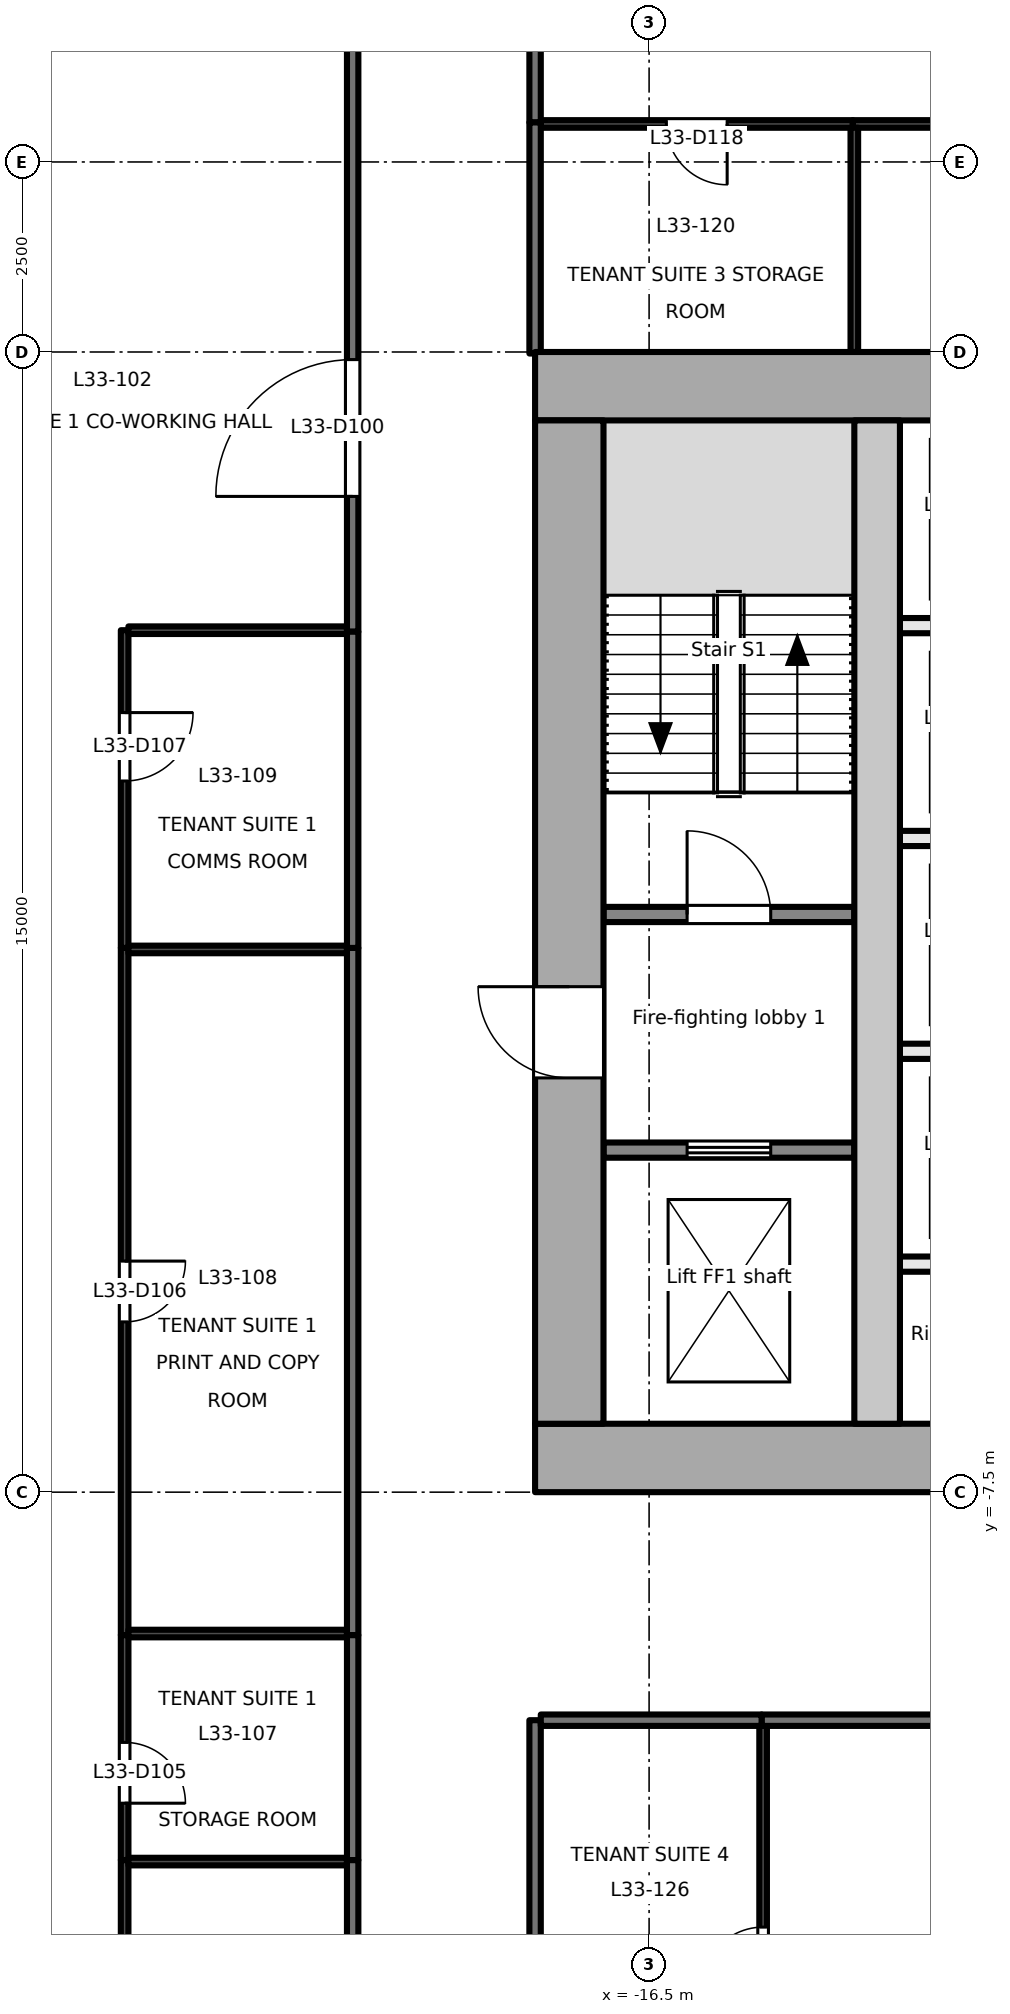
"""IFC4 building model, lengths in metres.
Left out: names, types, materials, properties, quantities, classifications, styles, units other than length and angle.
Written with IfcOpenShell. Run it as: python <this file> out.ifc"""

import sys

from ifc_helpers import new_model, si_unit, direction, frame, frame_2d, origin, place, context, subcontext, project, spatial, rectangle, extrude, element, fill, save


model = new_model("IFC4")
c1 = context("Model", 3, precision=1e-05, world=origin(), true_north=direction((0.0, 1.0)))
c2 = subcontext(c1, "Body", "Model", "MODEL_VIEW")
j1 = project(units=[si_unit("LENGTHUNIT", "METRE"), si_unit("PLANEANGLEUNIT", "RADIAN")], contexts=[c1])
p1 = place(None, origin())
s1 = spatial("IfcSite", under=j1, at=p1, CompositionType="ELEMENT")
p2 = place(p1, origin())
s2 = spatial("IfcBuilding", under=s1, at=p2, CompositionType="ELEMENT")
p3 = place(p2, frame((0.0, 0.0, 146.1)))
s3 = spatial("IfcBuildingStorey", under=s2, at=p3, CompositionType="ELEMENT", Elevation=146.1)
p4 = place(p3, frame((-18.0, -7.05, -0.2), z_axis=(0.0, 0.0, 1.0), x_axis=(1.0, 0.0, 0.0)))
e1 = element("IfcWall", 1, at=p4, inside=s3, PredefinedType="SHEAR", context=c2, shape_type="SweptSolid", body=[
    extrude(rectangle(XDim=36.0, YDim=0.9, at=frame_2d((18.0, 0.0))), origin(), (0.0, 0.0, 1.0), 4.0),
])
p5 = place(p4, frame((7.8, 0.0, 0.2)))
e2 = element("IfcOpeningElement", 2, at=p5, cuts=e1, PredefinedType="OPENING", context=c2, shape_type="SweptSolid", body=[
    extrude(rectangle(XDim=2.4, YDim=2.1, at=frame_2d((1.2, 1.05))), frame((0.0, 0.46, 0.0), z_axis=(0.0, -1.0, 0.0), x_axis=(1.0, 0.0, 0.0)), (0.0, 0.0, 1.0), 0.921),
])
p6 = place(p4, frame((17.4, 0.0, 0.2)))
e3 = element("IfcOpeningElement", 3, at=p6, cuts=e1, PredefinedType="OPENING", context=c2, shape_type="SweptSolid", body=[
    extrude(rectangle(XDim=1.2, YDim=2.1, at=frame_2d((0.6, 1.05))), frame((0.0, 0.46, 0.0), z_axis=(0.0, -1.0, 0.0), x_axis=(1.0, 0.0, 0.0)), (0.0, 0.0, 1.0), 0.921),
])
p7 = place(p4, frame((26.1, 0.0, 0.2)))
e4 = element("IfcOpeningElement", 4, at=p7, cuts=e1, PredefinedType="OPENING", context=c2, shape_type="SweptSolid", body=[
    extrude(rectangle(XDim=2.4, YDim=2.1, at=frame_2d((1.2, 1.05))), frame((0.0, 0.46, 0.0), z_axis=(0.0, -1.0, 0.0), x_axis=(1.0, 0.0, 0.0)), (0.0, 0.0, 1.0), 0.921),
])
p8 = place(p3, frame((-18.0, 7.05, -0.2), z_axis=(0.0, 0.0, 1.0), x_axis=(1.0, 0.0, 0.0)))
e5 = element("IfcWall", 5, at=p8, inside=s3, PredefinedType="SHEAR", context=c2, shape_type="SweptSolid", body=[
    extrude(rectangle(XDim=36.0, YDim=0.9, at=frame_2d((18.0, 0.0))), origin(), (0.0, 0.0, 1.0), 4.0),
])
p9 = place(p3, frame((-17.55, -6.6, -0.2), z_axis=(0.0, 0.0, 1.0), x_axis=(0.0, 1.0, 0.0)))
e6 = element("IfcWall", 6, at=p9, inside=s3, PredefinedType="SHEAR", context=c2, shape_type="SweptSolid", body=[
    extrude(rectangle(XDim=13.2, YDim=0.9, at=frame_2d((6.6, 0.0))), origin(), (0.0, 0.0, 1.0), 4.0),
])
p10 = place(p9, frame((4.55, 0.0, 0.2)))
e7 = element("IfcOpeningElement", 7, at=p10, cuts=e6, PredefinedType="OPENING", context=c2, shape_type="SweptSolid", body=[
    extrude(rectangle(XDim=1.2, YDim=2.1, at=frame_2d((0.6, 1.05))), frame((0.0, 0.46, 0.0), z_axis=(0.0, -1.0, 0.0), x_axis=(1.0, 0.0, 0.0)), (0.0, 0.0, 1.0), 0.921),
])
p11 = place(p3, frame((-13.5, -6.6, -0.2), z_axis=(0.0, 0.0, 1.0), x_axis=(0.0, 1.0, 0.0)))
e8 = element("IfcWall", 8, at=p11, inside=s3, PredefinedType="SHEAR", context=c2, shape_type="SweptSolid", body=[
    extrude(rectangle(XDim=13.2, YDim=0.6, at=frame_2d((6.6, 0.0))), origin(), (0.0, 0.0, 1.0), 4.0),
])
p12 = place(p3, frame((-17.1, -3.0, 0.0), z_axis=(0.0, 0.0, 1.0), x_axis=(1.0, 0.0, 0.0)))
e9 = element("IfcWall", 9, at=p12, inside=s3, PredefinedType="PARTITIONING", context=c2, shape_type="SweptSolid", body=[
    extrude(rectangle(XDim=3.3, YDim=0.2, at=frame_2d((1.65, 0.0))), origin(), (0.0, 0.0, 1.0), 3.8),
])
p13 = place(p12, frame((1.1, 0.0, 0.0)))
e10 = element("IfcOpeningElement", 10, at=p13, cuts=e9, PredefinedType="OPENING", context=c2, shape_type="SweptSolid", body=[
    extrude(rectangle(XDim=1.1, YDim=2.1, at=frame_2d((0.55, 1.05))), frame((0.0, 0.111, 0.0), z_axis=(0.0, -1.0, 0.0), x_axis=(1.0, 0.0, 0.0)), (0.0, 0.0, 1.0), 0.221),
])
p14 = place(p3, frame((-17.1, 0.1, 0.0), z_axis=(0.0, 0.0, 1.0), x_axis=(1.0, 0.0, 0.0)))
e11 = element("IfcWall", 11, at=p14, inside=s3, PredefinedType="PARTITIONING", context=c2, shape_type="SweptSolid", body=[
    extrude(rectangle(XDim=3.3, YDim=0.2, at=frame_2d((1.65, 0.0))), origin(), (0.0, 0.0, 1.0), 3.8),
])
p15 = place(p14, frame((1.1, 0.0, 0.0)))
e12 = element("IfcOpeningElement", 12, at=p15, cuts=e11, PredefinedType="OPENING", context=c2, shape_type="SweptSolid", body=[
    extrude(rectangle(XDim=1.1, YDim=2.1, at=frame_2d((0.55, 1.05))), frame((0.0, 0.111, 0.0), z_axis=(0.0, -1.0, 0.0), x_axis=(1.0, 0.0, 0.0)), (0.0, 0.0, 1.0), 0.221),
])
for number, where, z_axis, x_axis in (
    (13, (-13.2, -1.7, 0.0), (0.0, 0.0, 1.0), (1.0, 0.0, 0.0)),
    (14, (-13.2, 1.1, 0.0), (0.0, 0.0, 1.0), (1.0, 0.0, 0.0)),
    (15, (-13.2, 3.9, 0.0), (0.0, 0.0, 1.0), (1.0, 0.0, 0.0)),
    (16, (-13.2, -4.5, 0.0), (0.0, 0.0, 1.0), (1.0, 0.0, 0.0)),
):
    element("IfcWall", number, at=place(p3, frame(where, z_axis=z_axis, x_axis=x_axis)), inside=s3, PredefinedType="PARTITIONING", context=c2, shape_type="SweptSolid", body=[
        extrude(rectangle(XDim=2.3, YDim=0.2, at=frame_2d((1.15, 0.0))), origin(), (0.0, 0.0, 1.0), 3.8),
    ])
p16 = place(p3, frame((-20.4, 3.82, 0.0), z_axis=(0.0, 0.0, 1.0), x_axis=(0.0, 1.0, 0.0)))
e17 = element("IfcWall", 17, at=p16, inside=s3, PredefinedType="PARTITIONING", context=c2, shape_type="SweptSolid", body=[
    extrude(rectangle(XDim=8.42, YDim=0.15, at=frame_2d((4.21, 0.0))), origin(), (0.0, 0.0, 1.0), 3.3),
])
p17 = place(p16, frame((1.78, 0.0, 0.0)))
e18 = element("IfcOpeningElement", 18, at=p17, cuts=e17, PredefinedType="OPENING", context=c2, shape_type="SweptSolid", body=[
    extrude(rectangle(XDim=1.8, YDim=2.1, at=frame_2d((0.9, 1.05))), frame((0.0, 0.085, 0.0), z_axis=(0.0, -1.0, 0.0), x_axis=(1.0, 0.0, 0.0)), (0.0, 0.0, 1.0), 0.171),
])
p18 = place(p3, frame((-20.4, -16.54, 0.0), z_axis=(0.0, 0.0, 1.0), x_axis=(0.0, 1.0, 0.0)))
e19 = element("IfcWall", 19, at=p18, inside=s3, PredefinedType="PARTITIONING", context=c2, shape_type="SweptSolid", body=[
    extrude(rectangle(XDim=4.2, YDim=0.15, at=frame_2d((2.1, 0.0))), origin(), (0.0, 0.0, 1.0), 3.8),
])
p19 = place(p3, frame((-20.4, -12.34, 0.0), z_axis=(0.0, 0.0, 1.0), x_axis=(0.0, 1.0, 0.0)))
e20 = element("IfcWall", 20, at=p19, inside=s3, PredefinedType="PARTITIONING", context=c2, shape_type="SweptSolid", body=[
    extrude(rectangle(XDim=2.96, YDim=0.15, at=frame_2d((1.48, 0.0))), origin(), (0.0, 0.0, 1.0), 3.8),
])
p20 = place(p3, frame((-20.4, -9.38, 0.0), z_axis=(0.0, 0.0, 1.0), x_axis=(0.0, 1.0, 0.0)))
e21 = element("IfcWall", 21, at=p20, inside=s3, PredefinedType="PARTITIONING", context=c2, shape_type="SweptSolid", body=[
    extrude(rectangle(XDim=9.04, YDim=0.15, at=frame_2d((4.52, 0.0))), origin(), (0.0, 0.0, 1.0), 3.3),
])
p21 = place(p3, frame((-20.4, -0.34, 0.0), z_axis=(0.0, 0.0, 1.0), x_axis=(0.0, 1.0, 0.0)))
e22 = element("IfcWall", 22, at=p21, inside=s3, PredefinedType="PARTITIONING", context=c2, shape_type="SweptSolid", body=[
    extrude(rectangle(XDim=4.16, YDim=0.15, at=frame_2d((2.08, 0.0))), origin(), (0.0, 0.0, 1.0), 3.3),
])
p22 = place(p3, frame((-18.0, 12.24, 0.0), z_axis=(0.0, 0.0, 1.0), x_axis=(0.0, -1.0, 0.0)))
e23 = element("IfcWall", 23, at=p22, inside=s3, PredefinedType="PARTITIONING", context=c2, shape_type="SweptSolid", body=[
    extrude(rectangle(XDim=1.72, YDim=0.15, at=frame_2d((0.86, 0.0))), origin(), (0.0, 0.0, 1.0), 3.8),
])
p23 = place(p3, frame((-18.0, 10.52, 0.0), z_axis=(0.0, 0.0, 1.0), x_axis=(0.0, -1.0, 0.0)))
e24 = element("IfcWall", 24, at=p23, inside=s3, PredefinedType="PARTITIONING", context=c2, shape_type="SweptSolid", body=[
    extrude(rectangle(XDim=3.04, YDim=0.15, at=frame_2d((1.52, 0.0))), origin(), (0.0, 0.0, 1.0), 3.8),
])
p24 = place(p3, frame((-9.92, -10.5, 0.0), z_axis=(0.0, 0.0, 1.0), x_axis=(-1.0, 0.0, 0.0)))
e25 = element("IfcWall", 25, at=p24, inside=s3, PredefinedType="PARTITIONING", context=c2, shape_type="SweptSolid", body=[
    extrude(rectangle(XDim=5.1, YDim=0.15, at=frame_2d((2.55, 0.0))), origin(), (0.0, 0.0, 1.0), 2.9),
])
p25 = place(p3, frame((-18.0, -10.5, 0.0), z_axis=(0.0, 0.0, 1.0), x_axis=(0.0, -1.0, 0.0)))
e26 = element("IfcWall", 26, at=p25, inside=s3, PredefinedType="PARTITIONING", context=c2, shape_type="SweptSolid", body=[
    extrude(rectangle(XDim=4.78, YDim=0.15, at=frame_2d((2.39, 0.0))), origin(), (0.0, 0.0, 1.0), 3.8),
])
p26 = place(p3, frame((-15.02, -10.5, 0.0), z_axis=(0.0, 0.0, 1.0), x_axis=(-1.0, 0.0, 0.0)))
e27 = element("IfcWall", 27, at=p26, inside=s3, PredefinedType="PARTITIONING", context=c2, shape_type="SweptSolid", body=[
    extrude(rectangle(XDim=2.905, YDim=0.15, at=frame_2d((1.453, 0.0))), origin(), (0.0, 0.0, 1.0), 3.8),
])
p27 = place(p3, frame((-23.4, -12.34, 0.0), z_axis=(0.0, 0.0, 1.0), x_axis=(0.0, -1.0, 0.0)))
e28 = element("IfcWall", 28, at=p27, inside=s3, PredefinedType="PARTITIONING", context=c2, shape_type="SweptSolid", body=[
    extrude(rectangle(XDim=4.2, YDim=0.1, at=frame_2d((2.1, 0.0))), origin(), (0.0, 0.0, 1.0), 3.8),
])
p28 = place(p27, frame((1.12, 0.0, 0.0)))
e29 = element("IfcOpeningElement", 29, at=p28, cuts=e28, PredefinedType="OPENING", context=c2, shape_type="SweptSolid", body=[
    extrude(rectangle(XDim=0.8, YDim=2.1, at=frame_2d((0.4, 1.05))), frame((0.0, 0.061, 0.0), z_axis=(0.0, -1.0, 0.0), x_axis=(1.0, 0.0, 0.0)), (0.0, 0.0, 1.0), 0.121),
])
p29 = place(p3, frame((-23.4, -9.38, 0.0), z_axis=(0.0, 0.0, 1.0), x_axis=(0.0, -1.0, 0.0)))
e30 = element("IfcWall", 30, at=p29, inside=s3, PredefinedType="PARTITIONING", context=c2, shape_type="SweptSolid", body=[
    extrude(rectangle(XDim=2.96, YDim=0.1, at=frame_2d((1.48, 0.0))), origin(), (0.0, 0.0, 1.0), 3.8),
])
p30 = place(p29, frame((1.412, 0.0, 0.0)))
e31 = element("IfcOpeningElement", 31, at=p30, cuts=e30, PredefinedType="OPENING", context=c2, shape_type="SweptSolid", body=[
    extrude(rectangle(XDim=0.8, YDim=2.1, at=frame_2d((0.4, 1.05))), frame((0.0, 0.061, 0.0), z_axis=(0.0, -1.0, 0.0), x_axis=(1.0, 0.0, 0.0)), (0.0, 0.0, 1.0), 0.121),
])
p31 = place(p3, frame((-23.4, -0.34, 0.0), z_axis=(0.0, 0.0, 1.0), x_axis=(0.0, -1.0, 0.0)))
e32 = element("IfcWall", 32, at=p31, inside=s3, PredefinedType="PARTITIONING", context=c2, shape_type="SweptSolid", body=[
    extrude(rectangle(XDim=9.04, YDim=0.1, at=frame_2d((4.52, 0.0))), origin(), (0.0, 0.0, 1.0), 3.3),
])
p32 = place(p31, frame((4.12, 0.0, 0.0)))
e33 = element("IfcOpeningElement", 33, at=p32, cuts=e32, PredefinedType="OPENING", context=c2, shape_type="SweptSolid", body=[
    extrude(rectangle(XDim=0.8, YDim=2.1, at=frame_2d((0.4, 1.05))), frame((0.0, 0.061, 0.0), z_axis=(0.0, -1.0, 0.0), x_axis=(1.0, 0.0, 0.0)), (0.0, 0.0, 1.0), 0.121),
])
p33 = place(p3, frame((-23.4, 3.84, 0.0), z_axis=(0.0, 0.0, 1.0), x_axis=(0.0, -1.0, 0.0)))
e34 = element("IfcWall", 34, at=p33, inside=s3, PredefinedType="PARTITIONING", context=c2, shape_type="SweptSolid", body=[
    extrude(rectangle(XDim=4.18, YDim=0.1, at=frame_2d((2.09, 0.0))), origin(), (0.0, 0.0, 1.0), 3.3),
])
p34 = place(p33, frame((1.084, 0.0, 0.0)))
e35 = element("IfcOpeningElement", 35, at=p34, cuts=e34, PredefinedType="OPENING", context=c2, shape_type="SweptSolid", body=[
    extrude(rectangle(XDim=0.9, YDim=2.1, at=frame_2d((0.45, 1.05))), frame((0.0, 0.061, 0.0), z_axis=(0.0, -1.0, 0.0), x_axis=(1.0, 0.0, 0.0)), (0.0, 0.0, 1.0), 0.121),
])
for number, where, z_axis, x_axis in (
    (36, (-20.475, 3.84, 0.0), (0.0, 0.0, 1.0), (-1.0, 0.0, 0.0)),
    (37, (-23.35, -12.36, 0.0), (0.0, 0.0, 1.0), (1.0, 0.0, 0.0)),
    (38, (-23.35, -9.36, 0.0), (0.0, 0.0, 1.0), (1.0, 0.0, 0.0)),
    (39, (-23.35, -0.36, 0.0), (0.0, 0.0, 1.0), (1.0, 0.0, 0.0)),
):
    element("IfcWall", number, at=place(p3, frame(where, z_axis=z_axis, x_axis=x_axis)), inside=s3, PredefinedType="PARTITIONING", context=c2, shape_type="SweptSolid", body=[
        extrude(rectangle(XDim=2.875, YDim=0.1, at=frame_2d((1.438, 0.0))), origin(), (0.0, 0.0, 1.0), 3.8),
    ])
p35 = place(p3, frame((-13.82, 10.5, 0.0), z_axis=(0.0, 0.0, 1.0), x_axis=(-1.0, 0.0, 0.0)))
e40 = element("IfcWall", 40, at=p35, inside=s3, PredefinedType="PARTITIONING", context=c2, shape_type="SweptSolid", body=[
    extrude(rectangle(XDim=4.105, YDim=0.1, at=frame_2d((2.052, 0.0))), origin(), (0.0, 0.0, 1.0), 3.8),
])
p36 = place(p35, frame((1.653, 0.0, 0.0)))
e41 = element("IfcOpeningElement", 41, at=p36, cuts=e40, PredefinedType="OPENING", context=c2, shape_type="SweptSolid", body=[
    extrude(rectangle(XDim=0.8, YDim=2.1, at=frame_2d((0.4, 1.05))), frame((0.0, 0.061, 0.0), z_axis=(0.0, -1.0, 0.0), x_axis=(1.0, 0.0, 0.0)), (0.0, 0.0, 1.0), 0.121),
])
p37 = place(p3, frame((-5.98, 10.5, 0.0), z_axis=(0.0, 0.0, 1.0), x_axis=(-1.0, 0.0, 0.0)))
e42 = element("IfcWall", 42, at=p37, inside=s3, PredefinedType="PARTITIONING", context=c2, shape_type="SweptSolid", body=[
    extrude(rectangle(XDim=7.84, YDim=0.1, at=frame_2d((3.92, 0.0))), origin(), (0.0, 0.0, 1.0), 3.5),
])
p38 = place(p37, frame((2.182, 0.0, 0.0)))
e43 = element("IfcOpeningElement", 43, at=p38, cuts=e42, PredefinedType="OPENING", context=c2, shape_type="SweptSolid", body=[
    extrude(rectangle(XDim=0.9, YDim=2.1, at=frame_2d((0.45, 1.05))), frame((0.0, 0.061, 0.0), z_axis=(0.0, -1.0, 0.0), x_axis=(1.0, 0.0, 0.0)), (0.0, 0.0, 1.0), 0.121),
])
p39 = place(p3, frame((-13.8, 10.45, 0.0), z_axis=(0.0, 0.0, 1.0), x_axis=(0.0, -1.0, 0.0)))
e44 = element("IfcWall", 44, at=p39, inside=s3, PredefinedType="PARTITIONING", context=c2, shape_type="SweptSolid", body=[
    extrude(rectangle(XDim=2.95, YDim=0.1, at=frame_2d((1.475, 0.0))), origin(), (0.0, 0.0, 1.0), 3.8),
])
p40 = place(p3, frame((-15.0, -15.3, 0.0), z_axis=(0.0, 0.0, 1.0), x_axis=(0.0, 1.0, 0.0)))
e45 = element("IfcWall", 45, at=p40, inside=s3, PredefinedType="PARTITIONING", context=c2, shape_type="SweptSolid", body=[
    extrude(rectangle(XDim=4.725, YDim=0.1, at=frame_2d((2.363, 0.0))), origin(), (0.0, 0.0, 1.0), 3.8),
])
p41 = place(p40, frame((1.278, 0.0, 0.0)))
e46 = element("IfcOpeningElement", 46, at=p41, cuts=e45, PredefinedType="OPENING", context=c2, shape_type="SweptSolid", body=[
    extrude(rectangle(XDim=0.8, YDim=2.1, at=frame_2d((0.4, 1.05))), frame((0.0, 0.061, 0.0), z_axis=(0.0, -1.0, 0.0), x_axis=(1.0, 0.0, 0.0)), (0.0, 0.0, 1.0), 0.121),
])
p42 = place(p13, origin())
e47 = element("IfcDoor", 47, at=p42, inside=s3, OperationType="DOUBLE_DOOR_SLIDING", PredefinedType="DOOR", context=c2, shape_type="SweptSolid", body=[
    extrude(rectangle(XDim=1.1, YDim=2.1, at=frame_2d((0.55, 1.05))), frame((0.0, 0.025, 0.0), z_axis=(0.0, -1.0, 0.0), x_axis=(1.0, 0.0, 0.0)), (0.0, 0.0, 1.0), 0.05),
])
fill(e10, e47)
p43 = place(p10, origin())
e48 = element("IfcDoor", 48, at=p43, inside=s3, OperationType="SINGLE_SWING_RIGHT", PredefinedType="DOOR", context=c2, shape_type="SweptSolid", body=[
    extrude(rectangle(XDim=1.2, YDim=2.1, at=frame_2d((0.6, 1.05))), frame((0.0, 0.025, 0.0), z_axis=(0.0, -1.0, 0.0), x_axis=(1.0, 0.0, 0.0)), (0.0, 0.0, 1.0), 0.05),
])
fill(e7, e48)
p44 = place(p15, origin())
e49 = element("IfcDoor", 49, at=p44, inside=s3, OperationType="SINGLE_SWING_LEFT", PredefinedType="DOOR", context=c2, shape_type="SweptSolid", body=[
    extrude(rectangle(XDim=1.1, YDim=2.1, at=frame_2d((0.55, 1.05))), frame((0.0, 0.025, 0.0), z_axis=(0.0, -1.0, 0.0), x_axis=(1.0, 0.0, 0.0)), (0.0, 0.0, 1.0), 0.05),
])
fill(e12, e49)
p45 = place(p17, origin())
e50 = element("IfcDoor", 50, at=p45, inside=s3, OperationType="DOUBLE_DOOR_SINGLE_SWING", PredefinedType="DOOR", context=c2, shape_type="SweptSolid", body=[
    extrude(rectangle(XDim=1.8, YDim=2.1, at=frame_2d((0.9, 1.05))), frame((0.0, 0.025, 0.0), z_axis=(0.0, -1.0, 0.0), x_axis=(1.0, 0.0, 0.0)), (0.0, 0.0, 1.0), 0.05),
])
fill(e18, e50)
p46 = place(p30, origin())
e51 = element("IfcDoor", 51, at=p46, inside=s3, OperationType="SINGLE_SWING_RIGHT", PredefinedType="DOOR", context=c2, shape_type="SweptSolid", body=[
    extrude(rectangle(XDim=0.8, YDim=2.1, at=frame_2d((0.4, 1.05))), frame((0.0, 0.025, 0.0), z_axis=(0.0, -1.0, 0.0), x_axis=(1.0, 0.0, 0.0)), (0.0, 0.0, 1.0), 0.05),
])
fill(e31, e51)
p47 = place(p32, origin())
e52 = element("IfcDoor", 52, at=p47, inside=s3, OperationType="SINGLE_SWING_LEFT", PredefinedType="DOOR", context=c2, shape_type="SweptSolid", body=[
    extrude(rectangle(XDim=0.8, YDim=2.1, at=frame_2d((0.4, 1.05))), frame((0.0, 0.025, 0.0), z_axis=(0.0, -1.0, 0.0), x_axis=(1.0, 0.0, 0.0)), (0.0, 0.0, 1.0), 0.05),
])
fill(e33, e52)
p48 = place(p34, origin())
e53 = element("IfcDoor", 53, at=p48, inside=s3, OperationType="SINGLE_SWING_LEFT", PredefinedType="DOOR", context=c2, shape_type="SweptSolid", body=[
    extrude(rectangle(XDim=0.9, YDim=2.1, at=frame_2d((0.45, 1.05))), frame((0.0, 0.025, 0.0), z_axis=(0.0, -1.0, 0.0), x_axis=(1.0, 0.0, 0.0)), (0.0, 0.0, 1.0), 0.05),
])
fill(e35, e53)
p49 = place(p36, origin())
e54 = element("IfcDoor", 54, at=p49, inside=s3, OperationType="SINGLE_SWING_LEFT", PredefinedType="DOOR", context=c2, shape_type="SweptSolid", body=[
    extrude(rectangle(XDim=0.8, YDim=2.1, at=frame_2d((0.4, 1.05))), frame((0.0, 0.025, 0.0), z_axis=(0.0, -1.0, 0.0), x_axis=(1.0, 0.0, 0.0)), (0.0, 0.0, 1.0), 0.05),
])
fill(e41, e54)
p50 = place(p41, origin())
e55 = element("IfcDoor", 55, at=p50, inside=s3, OperationType="SINGLE_SWING_LEFT", PredefinedType="DOOR", context=c2, shape_type="SweptSolid", body=[
    extrude(rectangle(XDim=0.8, YDim=2.1, at=frame_2d((0.4, 1.05))), frame((0.0, 0.025, 0.0), z_axis=(0.0, -1.0, 0.0), x_axis=(1.0, 0.0, 0.0)), (0.0, 0.0, 1.0), 0.05),
])
fill(e46, e55)
save(model, sys.argv[1])
